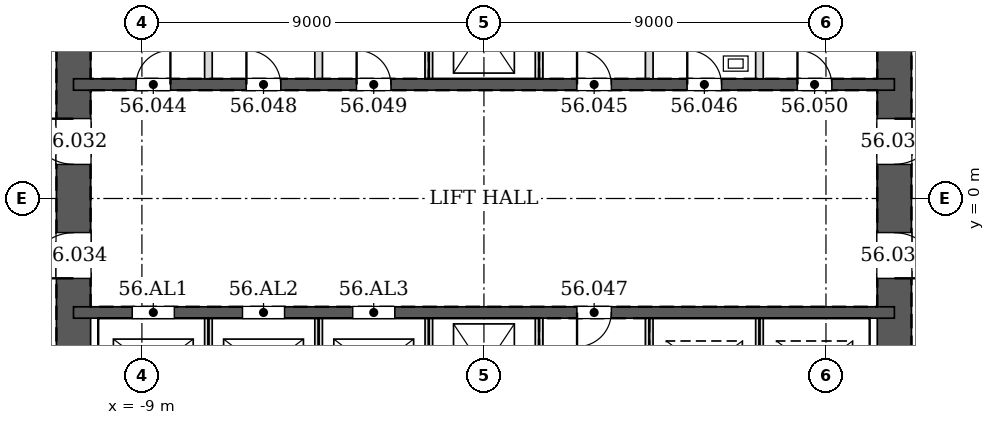
"""IFC4 building model, lengths in metres.
Left out: names, types, materials, properties, quantities, classifications, styles, units other than length and angle.
Written with IfcOpenShell. Run it as: python <this file> out.ifc"""

import sys

from ifc_helpers import new_model, si_unit, direction, frame, frame_2d, origin, place, context, subcontext, project, spatial, rectangle, extrude, element, fill, save


model = new_model("IFC4")
c1 = context("Model", 3, precision=1e-05, world=origin(), true_north=direction((0.0, 1.0)))
c2 = subcontext(c1, "Body", "Model", "MODEL_VIEW")
j1 = project(units=[si_unit("LENGTHUNIT", "METRE"), si_unit("PLANEANGLEUNIT", "RADIAN")], contexts=[c1])
p1 = place(None, origin())
s1 = spatial("IfcSite", under=j1, at=p1, CompositionType="ELEMENT")
p2 = place(p1, origin())
s2 = spatial("IfcBuilding", under=s1, at=p2, CompositionType="ELEMENT")
p3 = place(p2, frame((0.0, 0.0, 238.0)))
s3 = spatial("IfcBuildingStorey", under=s2, at=p3, CompositionType="ELEMENT", Elevation=238.0)
p4 = place(p3, frame((10.8, -10.8, 0.0), z_axis=(0.0, 0.0, 1.0), x_axis=(0.0, 1.0, 0.0)))
e1 = element("IfcWall", 1, at=p4, inside=s3, PredefinedType="SOLIDWALL", context=c2, shape_type="SweptSolid", body=[
    extrude(rectangle(XDim=21.6, YDim=0.9, at=frame_2d((10.8, 0.0))), origin(), (0.0, 0.0, 1.0), 3.4),
])
p5 = place(p4, frame((11.7, 0.0, 0.0)))
e2 = element("IfcOpeningElement", 2, at=p5, cuts=e1, PredefinedType="OPENING", context=c2, shape_type="SweptSolid", body=[
    extrude(rectangle(XDim=1.2, YDim=2.1, at=frame_2d((0.6, 1.05))), frame((0.0, 0.46, 0.0), z_axis=(0.0, -1.0, 0.0), x_axis=(1.0, 0.0, 0.0)), (0.0, 0.0, 1.0), 0.92),
])
p6 = place(p4, frame((8.7, 0.0, 0.0)))
e3 = element("IfcOpeningElement", 3, at=p6, cuts=e1, PredefinedType="OPENING", context=c2, shape_type="SweptSolid", body=[
    extrude(rectangle(XDim=1.2, YDim=2.1, at=frame_2d((0.6, 1.05))), frame((0.0, 0.46, 0.0), z_axis=(0.0, -1.0, 0.0), x_axis=(1.0, 0.0, 0.0)), (0.0, 0.0, 1.0), 0.92),
])
p7 = place(p3, frame((-10.8, 10.8, 0.0), z_axis=(0.0, 0.0, 1.0), x_axis=(0.0, -1.0, 0.0)))
e4 = element("IfcWall", 4, at=p7, inside=s3, PredefinedType="SOLIDWALL", context=c2, shape_type="SweptSolid", body=[
    extrude(rectangle(XDim=21.6, YDim=0.9, at=frame_2d((10.8, 0.0))), origin(), (0.0, 0.0, 1.0), 3.4),
])
p8 = place(p7, frame((8.7, 0.0, 0.0)))
e5 = element("IfcOpeningElement", 5, at=p8, cuts=e4, PredefinedType="OPENING", context=c2, shape_type="SweptSolid", body=[
    extrude(rectangle(XDim=1.2, YDim=2.1, at=frame_2d((0.6, 1.05))), frame((0.0, 0.46, 0.0), z_axis=(0.0, -1.0, 0.0), x_axis=(1.0, 0.0, 0.0)), (0.0, 0.0, 1.0), 0.92),
])
p9 = place(p7, frame((11.7, 0.0, 0.0)))
e6 = element("IfcOpeningElement", 6, at=p9, cuts=e4, PredefinedType="OPENING", context=c2, shape_type="SweptSolid", body=[
    extrude(rectangle(XDim=1.2, YDim=2.1, at=frame_2d((0.6, 1.05))), frame((0.0, 0.46, 0.0), z_axis=(0.0, -1.0, 0.0), x_axis=(1.0, 0.0, 0.0)), (0.0, 0.0, 1.0), 0.92),
])
p10 = place(p3, frame((-10.8, 3.0, 0.0), z_axis=(0.0, 0.0, 1.0), x_axis=(1.0, 0.0, 0.0)))
e7 = element("IfcWall", 7, at=p10, inside=s3, PredefinedType="SOLIDWALL", context=c2, shape_type="SweptSolid", body=[
    extrude(rectangle(XDim=21.6, YDim=0.3, at=frame_2d((10.8, 0.0))), origin(), (0.0, 0.0, 1.0), 3.4),
])
p11 = place(p10, frame((1.65, 0.0, 0.0)))
e8 = element("IfcOpeningElement", 8, at=p11, cuts=e7, PredefinedType="OPENING", context=c2, shape_type="SweptSolid", body=[
    extrude(rectangle(XDim=0.9, YDim=2.1, at=frame_2d((0.45, 1.05))), frame((0.0, 0.16, 0.0), z_axis=(0.0, -1.0, 0.0), x_axis=(1.0, 0.0, 0.0)), (0.0, 0.0, 1.0), 0.32),
])
p12 = place(p10, frame((13.25, 0.0, 0.0)))
e9 = element("IfcOpeningElement", 9, at=p12, cuts=e7, PredefinedType="OPENING", context=c2, shape_type="SweptSolid", body=[
    extrude(rectangle(XDim=0.9, YDim=2.1, at=frame_2d((0.45, 1.05))), frame((0.0, 0.16, 0.0), z_axis=(0.0, -1.0, 0.0), x_axis=(1.0, 0.0, 0.0)), (0.0, 0.0, 1.0), 0.32),
])
p13 = place(p10, frame((16.15, 0.0, 0.0)))
e10 = element("IfcOpeningElement", 10, at=p13, cuts=e7, PredefinedType="OPENING", context=c2, shape_type="SweptSolid", body=[
    extrude(rectangle(XDim=0.9, YDim=2.1, at=frame_2d((0.45, 1.05))), frame((0.0, 0.16, 0.0), z_axis=(0.0, -1.0, 0.0), x_axis=(1.0, 0.0, 0.0)), (0.0, 0.0, 1.0), 0.32),
])
p14 = place(p10, frame((4.55, 0.0, 0.0)))
e11 = element("IfcOpeningElement", 11, at=p14, cuts=e7, PredefinedType="OPENING", context=c2, shape_type="SweptSolid", body=[
    extrude(rectangle(XDim=0.9, YDim=2.1, at=frame_2d((0.45, 1.05))), frame((0.0, 0.16, 0.0), z_axis=(0.0, -1.0, 0.0), x_axis=(1.0, 0.0, 0.0)), (0.0, 0.0, 1.0), 0.32),
])
p15 = place(p10, frame((7.45, 0.0, 0.0)))
e12 = element("IfcOpeningElement", 12, at=p15, cuts=e7, PredefinedType="OPENING", context=c2, shape_type="SweptSolid", body=[
    extrude(rectangle(XDim=0.9, YDim=2.1, at=frame_2d((0.45, 1.05))), frame((0.0, 0.16, 0.0), z_axis=(0.0, -1.0, 0.0), x_axis=(1.0, 0.0, 0.0)), (0.0, 0.0, 1.0), 0.32),
])
p16 = place(p10, frame((19.05, 0.0, 0.0)))
e13 = element("IfcOpeningElement", 13, at=p16, cuts=e7, PredefinedType="OPENING", context=c2, shape_type="SweptSolid", body=[
    extrude(rectangle(XDim=0.9, YDim=2.1, at=frame_2d((0.45, 1.05))), frame((0.0, 0.16, 0.0), z_axis=(0.0, -1.0, 0.0), x_axis=(1.0, 0.0, 0.0)), (0.0, 0.0, 1.0), 0.32),
])
p17 = place(p3, frame((-10.8, -3.0, 0.0), z_axis=(0.0, 0.0, 1.0), x_axis=(1.0, 0.0, 0.0)))
e14 = element("IfcWall", 14, at=p17, inside=s3, PredefinedType="SOLIDWALL", context=c2, shape_type="SweptSolid", body=[
    extrude(rectangle(XDim=21.6, YDim=0.3, at=frame_2d((10.8, 0.0))), origin(), (0.0, 0.0, 1.0), 3.4),
])
p18 = place(p17, frame((13.25, 0.0, 0.0)))
e15 = element("IfcOpeningElement", 15, at=p18, cuts=e14, PredefinedType="OPENING", context=c2, shape_type="SweptSolid", body=[
    extrude(rectangle(XDim=0.9, YDim=2.1, at=frame_2d((0.45, 1.05))), frame((0.0, 0.16, 0.0), z_axis=(0.0, -1.0, 0.0), x_axis=(1.0, 0.0, 0.0)), (0.0, 0.0, 1.0), 0.32),
])
p19 = place(p17, frame((1.55, 0.0, 0.0)))
e16 = element("IfcOpeningElement", 16, at=p19, cuts=e14, PredefinedType="OPENING", context=c2, shape_type="SweptSolid", body=[
    extrude(rectangle(XDim=1.1, YDim=2.1, at=frame_2d((0.55, 1.05))), frame((0.0, 0.16, 0.0), z_axis=(0.0, -1.0, 0.0), x_axis=(1.0, 0.0, 0.0)), (0.0, 0.0, 1.0), 0.32),
])
p20 = place(p17, frame((4.45, 0.0, 0.0)))
e17 = element("IfcOpeningElement", 17, at=p20, cuts=e14, PredefinedType="OPENING", context=c2, shape_type="SweptSolid", body=[
    extrude(rectangle(XDim=1.1, YDim=2.1, at=frame_2d((0.55, 1.05))), frame((0.0, 0.16, 0.0), z_axis=(0.0, -1.0, 0.0), x_axis=(1.0, 0.0, 0.0)), (0.0, 0.0, 1.0), 0.32),
])
p21 = place(p17, frame((7.35, 0.0, 0.0)))
e18 = element("IfcOpeningElement", 18, at=p21, cuts=e14, PredefinedType="OPENING", context=c2, shape_type="SweptSolid", body=[
    extrude(rectangle(XDim=1.1, YDim=2.1, at=frame_2d((0.55, 1.05))), frame((0.0, 0.16, 0.0), z_axis=(0.0, -1.0, 0.0), x_axis=(1.0, 0.0, 0.0)), (0.0, 0.0, 1.0), 0.32),
])
for number, where, z_axis, x_axis in (
    (19, (-7.25, 3.15, 0.0), (0.0, 0.0, 1.0), (0.0, 1.0, 0.0)),
    (20, (-4.35, 3.15, 0.0), (0.0, 0.0, 1.0), (0.0, 1.0, 0.0)),
    (21, (-1.45, 3.15, 0.0), (0.0, 0.0, 1.0), (0.0, 1.0, 0.0)),
    (22, (1.45, 3.15, 0.0), (0.0, 0.0, 1.0), (0.0, 1.0, 0.0)),
    (23, (4.35, 3.15, 0.0), (0.0, 0.0, 1.0), (0.0, 1.0, 0.0)),
    (24, (7.25, 3.15, 0.0), (0.0, 0.0, 1.0), (0.0, 1.0, 0.0)),
):
    element("IfcWall", number, at=place(p3, frame(where, z_axis=z_axis, x_axis=x_axis)), inside=s3, PredefinedType="PARTITIONING", context=c2, shape_type="SweptSolid", body=[
        extrude(rectangle(XDim=2.7, YDim=0.2, at=frame_2d((1.35, 0.0))), origin(), (0.0, 0.0, 1.0), 3.2),
    ])
for number, where, z_axis, x_axis in (
    (25, (-7.25, -5.85, 0.0), (0.0, 0.0, 1.0), (0.0, 1.0, 0.0)),
    (26, (-4.35, -5.85, 0.0), (0.0, 0.0, 1.0), (0.0, 1.0, 0.0)),
    (27, (-1.45, -5.85, 0.0), (0.0, 0.0, 1.0), (0.0, 1.0, 0.0)),
):
    element("IfcWall", number, at=place(p3, frame(where, z_axis=z_axis, x_axis=x_axis)), inside=s3, PredefinedType="PARTITIONING", context=c2, shape_type="SweptSolid", body=[
        extrude(rectangle(XDim=2.7, YDim=0.2, at=frame_2d((1.35, 0.0))), origin(), (0.0, 0.0, 1.0), 3.4),
    ])
for number, where, z_axis, x_axis in (
    (28, (1.45, -5.85, 0.0), (0.0, 0.0, 1.0), (0.0, 1.0, 0.0)),
    (29, (4.35, -5.85, 0.0), (0.0, 0.0, 1.0), (0.0, 1.0, 0.0)),
):
    element("IfcWall", number, at=place(p3, frame(where, z_axis=z_axis, x_axis=x_axis)), inside=s3, PredefinedType="PARTITIONING", context=c2, shape_type="SweptSolid", body=[
        extrude(rectangle(XDim=2.7, YDim=0.2, at=frame_2d((1.35, 0.0))), origin(), (0.0, 0.0, 1.0), 3.2),
    ])
p22 = place(p3, frame((7.25, -5.85, 0.0), z_axis=(0.0, 0.0, 1.0), x_axis=(0.0, 1.0, 0.0)))
e30 = element("IfcWall", 30, at=p22, inside=s3, PredefinedType="PARTITIONING", context=c2, shape_type="SweptSolid", body=[
    extrude(rectangle(XDim=2.7, YDim=0.2, at=frame_2d((1.35, 0.0))), origin(), (0.0, 0.0, 1.0), 3.4),
])
p23 = place(p5, frame((1.2, 0.0, 0.0), z_axis=(0.0, 0.0, 1.0), x_axis=(-1.0, 0.0, 0.0)))
e31 = element("IfcDoor", 31, at=p23, inside=s3, OperationType="SINGLE_SWING_LEFT", PredefinedType="DOOR", context=c2, shape_type="SweptSolid", body=[
    extrude(rectangle(XDim=1.2, YDim=2.1, at=frame_2d((0.6, 1.05))), frame((0.0, 0.025, 0.0), z_axis=(0.0, -1.0, 0.0), x_axis=(1.0, 0.0, 0.0)), (0.0, 0.0, 1.0), 0.05),
])
fill(e2, e31)
p24 = place(p8, frame((1.2, 0.0, 0.0), z_axis=(0.0, 0.0, 1.0), x_axis=(-1.0, 0.0, 0.0)))
e32 = element("IfcDoor", 32, at=p24, inside=s3, OperationType="SINGLE_SWING_RIGHT", PredefinedType="DOOR", context=c2, shape_type="SweptSolid", body=[
    extrude(rectangle(XDim=1.2, YDim=2.1, at=frame_2d((0.6, 1.05))), frame((0.0, 0.025, 0.0), z_axis=(0.0, -1.0, 0.0), x_axis=(1.0, 0.0, 0.0)), (0.0, 0.0, 1.0), 0.05),
])
fill(e5, e32)
p25 = place(p6, frame((1.2, 0.0, 0.0), z_axis=(0.0, 0.0, 1.0), x_axis=(-1.0, 0.0, 0.0)))
e33 = element("IfcDoor", 33, at=p25, inside=s3, OperationType="SINGLE_SWING_RIGHT", PredefinedType="DOOR", context=c2, shape_type="SweptSolid", body=[
    extrude(rectangle(XDim=1.2, YDim=2.1, at=frame_2d((0.6, 1.05))), frame((0.0, 0.025, 0.0), z_axis=(0.0, -1.0, 0.0), x_axis=(1.0, 0.0, 0.0)), (0.0, 0.0, 1.0), 0.05),
])
fill(e3, e33)
p26 = place(p9, frame((1.2, 0.0, 0.0), z_axis=(0.0, 0.0, 1.0), x_axis=(-1.0, 0.0, 0.0)))
e34 = element("IfcDoor", 34, at=p26, inside=s3, OperationType="SINGLE_SWING_LEFT", PredefinedType="DOOR", context=c2, shape_type="SweptSolid", body=[
    extrude(rectangle(XDim=1.2, YDim=2.1, at=frame_2d((0.6, 1.05))), frame((0.0, 0.025, 0.0), z_axis=(0.0, -1.0, 0.0), x_axis=(1.0, 0.0, 0.0)), (0.0, 0.0, 1.0), 0.05),
])
fill(e6, e34)
p27 = place(p11, origin())
e35 = element("IfcDoor", 35, at=p27, inside=s3, OperationType="SINGLE_SWING_RIGHT", PredefinedType="DOOR", context=c2, shape_type="SweptSolid", body=[
    extrude(rectangle(XDim=0.9, YDim=2.1, at=frame_2d((0.45, 1.05))), frame((0.0, 0.025, 0.0), z_axis=(0.0, -1.0, 0.0), x_axis=(1.0, 0.0, 0.0)), (0.0, 0.0, 1.0), 0.05),
])
fill(e8, e35)
p28 = place(p12, origin())
e36 = element("IfcDoor", 36, at=p28, inside=s3, OperationType="SINGLE_SWING_LEFT", PredefinedType="DOOR", context=c2, shape_type="SweptSolid", body=[
    extrude(rectangle(XDim=0.9, YDim=2.1, at=frame_2d((0.45, 1.05))), frame((0.0, 0.025, 0.0), z_axis=(0.0, -1.0, 0.0), x_axis=(1.0, 0.0, 0.0)), (0.0, 0.0, 1.0), 0.05),
])
fill(e9, e36)
p29 = place(p13, origin())
e37 = element("IfcDoor", 37, at=p29, inside=s3, OperationType="SINGLE_SWING_LEFT", PredefinedType="DOOR", context=c2, shape_type="SweptSolid", body=[
    extrude(rectangle(XDim=0.9, YDim=2.1, at=frame_2d((0.45, 1.05))), frame((0.0, 0.025, 0.0), z_axis=(0.0, -1.0, 0.0), x_axis=(1.0, 0.0, 0.0)), (0.0, 0.0, 1.0), 0.05),
])
fill(e10, e37)
p30 = place(p18, frame((0.9, 0.0, 0.0), z_axis=(0.0, 0.0, 1.0), x_axis=(-1.0, 0.0, 0.0)))
e38 = element("IfcDoor", 38, at=p30, inside=s3, OperationType="SINGLE_SWING_RIGHT", PredefinedType="DOOR", context=c2, shape_type="SweptSolid", body=[
    extrude(rectangle(XDim=0.9, YDim=2.1, at=frame_2d((0.45, 1.05))), frame((0.0, 0.025, 0.0), z_axis=(0.0, -1.0, 0.0), x_axis=(1.0, 0.0, 0.0)), (0.0, 0.0, 1.0), 0.05),
])
fill(e15, e38)
p31 = place(p14, origin())
e39 = element("IfcDoor", 39, at=p31, inside=s3, OperationType="SINGLE_SWING_LEFT", PredefinedType="DOOR", context=c2, shape_type="SweptSolid", body=[
    extrude(rectangle(XDim=0.9, YDim=2.1, at=frame_2d((0.45, 1.05))), frame((0.0, 0.025, 0.0), z_axis=(0.0, -1.0, 0.0), x_axis=(1.0, 0.0, 0.0)), (0.0, 0.0, 1.0), 0.05),
])
fill(e11, e39)
p32 = place(p15, origin())
e40 = element("IfcDoor", 40, at=p32, inside=s3, OperationType="SINGLE_SWING_LEFT", PredefinedType="DOOR", context=c2, shape_type="SweptSolid", body=[
    extrude(rectangle(XDim=0.9, YDim=2.1, at=frame_2d((0.45, 1.05))), frame((0.0, 0.025, 0.0), z_axis=(0.0, -1.0, 0.0), x_axis=(1.0, 0.0, 0.0)), (0.0, 0.0, 1.0), 0.05),
])
fill(e12, e40)
p33 = place(p16, origin())
e41 = element("IfcDoor", 41, at=p33, inside=s3, OperationType="SINGLE_SWING_LEFT", PredefinedType="DOOR", context=c2, shape_type="SweptSolid", body=[
    extrude(rectangle(XDim=0.9, YDim=2.1, at=frame_2d((0.45, 1.05))), frame((0.0, 0.025, 0.0), z_axis=(0.0, -1.0, 0.0), x_axis=(1.0, 0.0, 0.0)), (0.0, 0.0, 1.0), 0.05),
])
fill(e13, e41)
p34 = place(p19, origin())
e42 = element("IfcDoor", 42, at=p34, inside=s3, OperationType="DOUBLE_DOOR_SLIDING", PredefinedType="DOOR", context=c2, shape_type="SweptSolid", body=[
    extrude(rectangle(XDim=1.1, YDim=2.1, at=frame_2d((0.55, 1.05))), frame((0.0, 0.025, 0.0), z_axis=(0.0, -1.0, 0.0), x_axis=(1.0, 0.0, 0.0)), (0.0, 0.0, 1.0), 0.05),
])
fill(e16, e42)
p35 = place(p20, origin())
e43 = element("IfcDoor", 43, at=p35, inside=s3, OperationType="DOUBLE_DOOR_SLIDING", PredefinedType="DOOR", context=c2, shape_type="SweptSolid", body=[
    extrude(rectangle(XDim=1.1, YDim=2.1, at=frame_2d((0.55, 1.05))), frame((0.0, 0.025, 0.0), z_axis=(0.0, -1.0, 0.0), x_axis=(1.0, 0.0, 0.0)), (0.0, 0.0, 1.0), 0.05),
])
fill(e17, e43)
p36 = place(p21, origin())
e44 = element("IfcDoor", 44, at=p36, inside=s3, OperationType="DOUBLE_DOOR_SLIDING", PredefinedType="DOOR", context=c2, shape_type="SweptSolid", body=[
    extrude(rectangle(XDim=1.1, YDim=2.1, at=frame_2d((0.55, 1.05))), frame((0.0, 0.025, 0.0), z_axis=(0.0, -1.0, 0.0), x_axis=(1.0, 0.0, 0.0)), (0.0, 0.0, 1.0), 0.05),
])
fill(e18, e44)
save(model, sys.argv[1])
